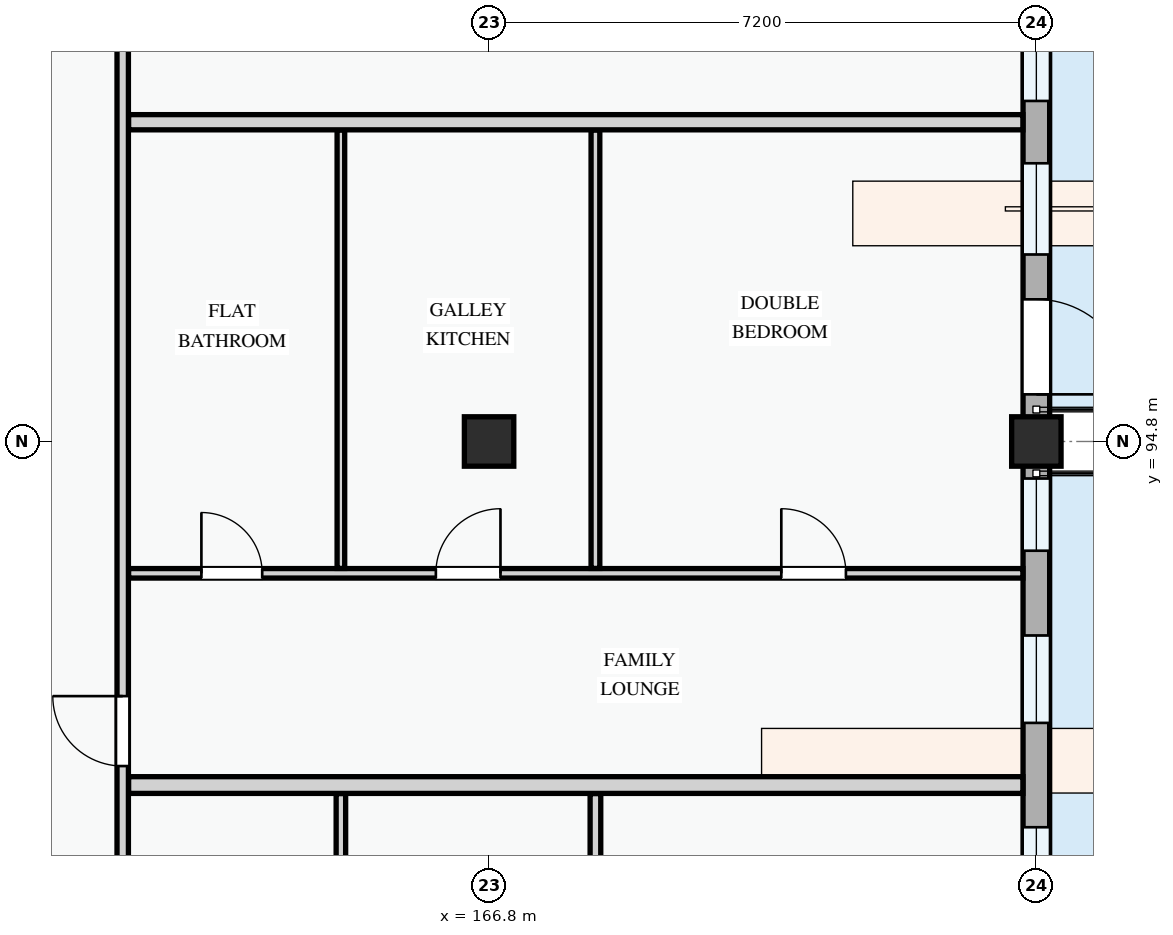
"""IFC4 building model, lengths in metres.
Left out: names, types, materials, properties, quantities, classifications, styles, units other than length and angle.
Written with IfcOpenShell. Run it as: python <this file> out.ifc"""

import sys

from ifc_helpers import new_model, si_unit, direction, frame, frame_2d, origin, origin_2d, place, context, subcontext, project, spatial, rectangle, extrude, element, fill, save


model = new_model("IFC4")
c1 = context("Model", 3, precision=1e-05, world=origin(), true_north=direction((0.0, 1.0)))
c2 = subcontext(c1, "Body", "Model", "MODEL_VIEW")
j1 = project(units=[si_unit("LENGTHUNIT", "METRE"), si_unit("PLANEANGLEUNIT", "RADIAN")], contexts=[c1])
p1 = place(None, origin())
s1 = spatial("IfcSite", under=j1, at=p1, CompositionType="ELEMENT")
p2 = place(p1, origin())
s2 = spatial("IfcBuilding", under=s1, at=p2, CompositionType="ELEMENT")
p3 = place(p2, frame((0.0, 0.0, 11.4)))
s3 = spatial("IfcBuildingStorey", under=s2, at=p3, CompositionType="ELEMENT", Elevation=11.4)
for number, where, z_axis, x_axis in (
    (1, (166.8, 94.8, 0.0), (0.0, 0.0, 1.0), (1.0, 0.0, 0.0)),
    (2, (174.0, 94.8, 0.0), (0.0, 0.0, 1.0), (1.0, 0.0, 0.0)),
):
    element("IfcColumn", number, at=place(p3, frame(where, z_axis=z_axis, x_axis=x_axis)), inside=s3, PredefinedType="COLUMN", context=c2, shape_type="SweptSolid", body=[
        extrude(rectangle(XDim=0.65, YDim=0.65, at=origin_2d()), origin(), (0.0, 0.0, 1.0), 3.3),
    ])
p4 = place(p3, frame((174.0, 86.4, 0.0), z_axis=(0.0, 0.0, 1.0), x_axis=(0.0, 1.0, 0.0)))
e3 = element("IfcWall", 3, at=p4, inside=s3, PredefinedType="STANDARD", context=c2, shape_type="SweptSolid", body=[
    extrude(rectangle(XDim=8.4, YDim=0.35, at=frame_2d((4.2, 0.0))), origin(), (0.0, 0.0, 1.0), 2.425),
])
p5 = place(p4, frame((0.62, 0.0, 0.0)))
e4 = element("IfcOpeningElement", 4, at=p5, cuts=e3, PredefinedType="OPENING", context=c2, shape_type="SweptSolid", body=[
    extrude(rectangle(XDim=1.2, YDim=2.15, at=frame_2d((0.6, 1.075))), frame((0.0, 0.185, 0.0), z_axis=(0.0, -1.0, 0.0), x_axis=(1.0, 0.0, 0.0)), (0.0, 0.0, 1.0), 0.37),
])
p6 = place(p4, frame((2.425, 0.0, 0.78)))
e5 = element("IfcOpeningElement", 5, at=p6, cuts=e3, PredefinedType="OPENING", context=c2, shape_type="SweptSolid", body=[
    extrude(rectangle(XDim=0.9, YDim=1.2, at=frame_2d((0.45, 0.6))), frame((0.0, 0.185, 0.0), z_axis=(0.0, -1.0, 0.0), x_axis=(1.0, 0.0, 0.0)), (0.0, 0.0, 1.0), 0.37),
])
p7 = place(p4, frame((4.698, 0.0, 0.78)))
e6 = element("IfcOpeningElement", 6, at=p7, cuts=e3, PredefinedType="OPENING", context=c2, shape_type="SweptSolid", body=[
    extrude(rectangle(XDim=1.15, YDim=1.25, at=frame_2d((0.575, 0.625))), frame((0.0, 0.185, 0.0), z_axis=(0.0, -1.0, 0.0), x_axis=(1.0, 0.0, 0.0)), (0.0, 0.0, 1.0), 0.37),
])
p8 = place(p4, frame((6.963, 0.0, 0.78)))
e7 = element("IfcOpeningElement", 7, at=p8, cuts=e3, PredefinedType="OPENING", context=c2, shape_type="SweptSolid", body=[
    extrude(rectangle(XDim=0.95, YDim=1.15, at=frame_2d((0.475, 0.575))), frame((0.0, 0.185, 0.0), z_axis=(0.0, -1.0, 0.0), x_axis=(1.0, 0.0, 0.0)), (0.0, 0.0, 1.0), 0.37),
])
p9 = place(p3, frame((174.0, 94.8, 0.0), z_axis=(0.0, 0.0, 1.0), x_axis=(0.0, 1.0, 0.0)))
e8 = element("IfcWall", 8, at=p9, inside=s3, PredefinedType="STANDARD", context=c2, shape_type="SweptSolid", body=[
    extrude(rectangle(XDim=6.0, YDim=0.35, at=frame_2d((3.0, 0.0))), origin(), (0.0, 0.0, 1.0), 2.575),
])
p10 = place(p9, frame((0.62, 0.0, 0.0)))
e9 = element("IfcOpeningElement", 9, at=p10, cuts=e8, PredefinedType="OPENING", context=c2, shape_type="SweptSolid", body=[
    extrude(rectangle(XDim=1.25, YDim=2.2, at=frame_2d((0.625, 1.1))), frame((0.0, 0.185, 0.0), z_axis=(0.0, -1.0, 0.0), x_axis=(1.0, 0.0, 0.0)), (0.0, 0.0, 1.0), 0.37),
])
p11 = place(p9, frame((2.46, 0.0, 0.78)))
e10 = element("IfcOpeningElement", 10, at=p11, cuts=e8, PredefinedType="OPENING", context=c2, shape_type="SweptSolid", body=[
    extrude(rectangle(XDim=1.2, YDim=1.5, at=frame_2d((0.6, 0.75))), frame((0.0, 0.185, 0.0), z_axis=(0.0, -1.0, 0.0), x_axis=(1.0, 0.0, 0.0)), (0.0, 0.0, 1.0), 0.37),
])
p12 = place(p9, frame((4.48, 0.0, 0.78)))
e11 = element("IfcOpeningElement", 11, at=p12, cuts=e8, PredefinedType="OPENING", context=c2, shape_type="SweptSolid", body=[
    extrude(rectangle(XDim=1.05, YDim=1.2, at=frame_2d((0.525, 0.6))), frame((0.0, 0.185, 0.0), z_axis=(0.0, -1.0, 0.0), x_axis=(1.0, 0.0, 0.0)), (0.0, 0.0, 1.0), 0.37),
])
p13 = place(p3, frame((168.199, 84.726, 0.0), z_axis=(0.0, 0.0, 1.0), x_axis=(0.0, 1.0, 0.0)))
e12 = element("IfcWall", 12, at=p13, inside=s3, PredefinedType="PARTITIONING", context=c2, shape_type="SweptSolid", body=[
    extrude(rectangle(XDim=5.442, YDim=0.14, at=frame_2d((2.721, 0.0))), origin(), (0.0, 0.0, 1.0), 3.0),
])
p14 = place(p3, frame((164.85, 84.726, 0.0), z_axis=(0.0, 0.0, 1.0), x_axis=(0.0, 1.0, 0.0)))
e13 = element("IfcWall", 13, at=p14, inside=s3, PredefinedType="PARTITIONING", context=c2, shape_type="SweptSolid", body=[
    extrude(rectangle(XDim=5.442, YDim=0.125, at=frame_2d((2.721, 0.0))), origin(), (0.0, 0.0, 1.0), 3.0),
])
p15 = place(p3, frame((162.057, 93.066, 0.0), z_axis=(0.0, 0.0, 1.0), x_axis=(1.0, 0.0, 0.0)))
e14 = element("IfcWall", 14, at=p15, inside=s3, PredefinedType="PARTITIONING", context=c2, shape_type="SweptSolid", body=[
    extrude(rectangle(XDim=11.766, YDim=0.125, at=frame_2d((5.883, 0.0))), origin(), (0.0, 0.0, 1.0), 3.0),
])
p16 = place(p15, frame((0.958, 0.0, 0.0)))
e15 = element("IfcOpeningElement", 15, at=p16, cuts=e14, PredefinedType="OPENING", context=c2, shape_type="SweptSolid", body=[
    extrude(rectangle(XDim=0.8, YDim=2.1, at=frame_2d((0.4, 1.05))), frame((0.0, 0.073, 0.0), z_axis=(0.0, -1.0, 0.0), x_axis=(1.0, 0.0, 0.0)), (0.0, 0.0, 1.0), 0.145),
])
p17 = place(p15, frame((4.043, 0.0, 0.0)))
e16 = element("IfcOpeningElement", 16, at=p17, cuts=e14, PredefinedType="OPENING", context=c2, shape_type="SweptSolid", body=[
    extrude(rectangle(XDim=0.85, YDim=2.1, at=frame_2d((0.425, 1.05))), frame((0.0, 0.073, 0.0), z_axis=(0.0, -1.0, 0.0), x_axis=(1.0, 0.0, 0.0)), (0.0, 0.0, 1.0), 0.145),
])
p18 = place(p15, frame((8.588, 0.0, 0.0)))
e17 = element("IfcOpeningElement", 17, at=p18, cuts=e14, PredefinedType="OPENING", context=c2, shape_type="SweptSolid", body=[
    extrude(rectangle(XDim=0.85, YDim=2.1, at=frame_2d((0.425, 1.05))), frame((0.0, 0.073, 0.0), z_axis=(0.0, -1.0, 0.0), x_axis=(1.0, 0.0, 0.0)), (0.0, 0.0, 1.0), 0.145),
])
p19 = place(p3, frame((168.199, 93.13, 0.0), z_axis=(0.0, 0.0, 1.0), x_axis=(0.0, 1.0, 0.0)))
e18 = element("IfcWall", 18, at=p19, inside=s3, PredefinedType="PARTITIONING", context=c2, shape_type="SweptSolid", body=[
    extrude(rectangle(XDim=5.768, YDim=0.115, at=frame_2d((2.884, 0.0))), origin(), (0.0, 0.0, 1.0), 3.0),
])
p20 = place(p3, frame((164.85, 93.13, 0.0), z_axis=(0.0, 0.0, 1.0), x_axis=(0.0, 1.0, 0.0)))
e19 = element("IfcWall", 19, at=p20, inside=s3, PredefinedType="PARTITIONING", context=c2, shape_type="SweptSolid", body=[
    extrude(rectangle(XDim=5.768, YDim=0.1, at=frame_2d((2.884, 0.0))), origin(), (0.0, 0.0, 1.0), 3.0),
])
p21 = place(p3, frame((162.057, 90.28, 0.0), z_axis=(0.0, 0.0, 1.0), x_axis=(1.0, 0.0, 0.0)))
e20 = element("IfcWall", 20, at=p21, inside=s3, PredefinedType="PARTITIONING", context=c2, shape_type="SweptSolid", body=[
    extrude(rectangle(XDim=11.766, YDim=0.22, at=frame_2d((5.883, 0.0))), origin(), (0.0, 0.0, 1.0), 3.0),
])
p22 = place(p3, frame((162.057, 99.0, 0.0), z_axis=(0.0, 0.0, 1.0), x_axis=(1.0, 0.0, 0.0)))
e21 = element("IfcWall", 21, at=p22, inside=s3, PredefinedType="PARTITIONING", context=c2, shape_type="SweptSolid", body=[
    extrude(rectangle(XDim=11.766, YDim=0.2, at=frame_2d((5.883, 0.0))), origin(), (0.0, 0.0, 1.0), 3.0),
])
p23 = place(p3, frame((161.98, 80.46, 0.0), z_axis=(0.0, 0.0, 1.0), x_axis=(0.0, 1.0, 0.0)))
e22 = element("IfcWall", 22, at=p23, inside=s3, PredefinedType="PARTITIONING", context=c2, shape_type="SweptSolid", body=[
    extrude(rectangle(XDim=28.88, YDim=0.15, at=frame_2d((14.44, 0.0))), origin(), (0.0, 0.0, 1.0), 3.0),
])
p24 = place(p23, frame((2.487, 0.0, 0.0)))
e23 = element("IfcOpeningElement", 23, at=p24, cuts=e22, PredefinedType="OPENING", context=c2, shape_type="SweptSolid", body=[
    extrude(rectangle(XDim=0.96, YDim=2.12, at=frame_2d((0.48, 1.06))), frame((0.0, 0.085, 0.0), z_axis=(0.0, -1.0, 0.0), x_axis=(1.0, 0.0, 0.0)), (0.0, 0.0, 1.0), 0.17),
])
p25 = place(p23, frame((10.07, 0.0, 0.0)))
e24 = element("IfcOpeningElement", 24, at=p25, cuts=e22, PredefinedType="OPENING", context=c2, shape_type="SweptSolid", body=[
    extrude(rectangle(XDim=0.92, YDim=2.1, at=frame_2d((0.46, 1.05))), frame((0.0, 0.085, 0.0), z_axis=(0.0, -1.0, 0.0), x_axis=(1.0, 0.0, 0.0)), (0.0, 0.0, 1.0), 0.17),
])
p26 = place(p23, frame((22.293, 0.0, 0.0)))
e25 = element("IfcOpeningElement", 25, at=p26, cuts=e22, PredefinedType="OPENING", context=c2, shape_type="SweptSolid", body=[
    extrude(rectangle(XDim=0.92, YDim=2.1, at=frame_2d((0.46, 1.05))), frame((0.0, 0.085, 0.0), z_axis=(0.0, -1.0, 0.0), x_axis=(1.0, 0.0, 0.0)), (0.0, 0.0, 1.0), 0.17),
])
p27 = place(p6, origin())
e26 = element("IfcWindow", 26, at=p27, inside=s3, PartitioningType="SINGLE_PANEL", PredefinedType="WINDOW", context=c2, shape_type="SweptSolid", body=[
    extrude(rectangle(XDim=0.9, YDim=1.2, at=frame_2d((0.45, 0.6))), frame((0.0, 0.03, 0.0), z_axis=(0.0, -1.0, 0.0), x_axis=(1.0, 0.0, 0.0)), (0.0, 0.0, 1.0), 0.06),
])
fill(e5, e26)
p28 = place(p7, origin())
e27 = element("IfcWindow", 27, at=p28, inside=s3, PartitioningType="SINGLE_PANEL", PredefinedType="WINDOW", context=c2, shape_type="SweptSolid", body=[
    extrude(rectangle(XDim=1.15, YDim=1.25, at=frame_2d((0.575, 0.625))), frame((0.0, 0.03, 0.0), z_axis=(0.0, -1.0, 0.0), x_axis=(1.0, 0.0, 0.0)), (0.0, 0.0, 1.0), 0.06),
])
fill(e6, e27)
p29 = place(p8, origin())
e28 = element("IfcWindow", 28, at=p29, inside=s3, PartitioningType="SINGLE_PANEL", PredefinedType="WINDOW", context=c2, shape_type="SweptSolid", body=[
    extrude(rectangle(XDim=0.95, YDim=1.15, at=frame_2d((0.475, 0.575))), frame((0.0, 0.03, 0.0), z_axis=(0.0, -1.0, 0.0), x_axis=(1.0, 0.0, 0.0)), (0.0, 0.0, 1.0), 0.06),
])
fill(e7, e28)
p30 = place(p10, frame((1.25, 0.0, 0.0), z_axis=(0.0, 0.0, 1.0), x_axis=(-1.0, 0.0, 0.0)))
e29 = element("IfcDoor", 29, at=p30, inside=s3, OperationType="SINGLE_SWING_RIGHT", PredefinedType="DOOR", context=c2, shape_type="SweptSolid", body=[
    extrude(rectangle(XDim=1.25, YDim=2.2, at=frame_2d((0.625, 1.1))), frame((0.0, 0.025, 0.0), z_axis=(0.0, -1.0, 0.0), x_axis=(1.0, 0.0, 0.0)), (0.0, 0.0, 1.0), 0.05),
])
fill(e9, e29)
p31 = place(p11, origin())
e30 = element("IfcWindow", 30, at=p31, inside=s3, PartitioningType="SINGLE_PANEL", PredefinedType="WINDOW", context=c2, shape_type="SweptSolid", body=[
    extrude(rectangle(XDim=1.2, YDim=1.5, at=frame_2d((0.6, 0.75))), frame((0.0, 0.03, 0.0), z_axis=(0.0, -1.0, 0.0), x_axis=(1.0, 0.0, 0.0)), (0.0, 0.0, 1.0), 0.06),
])
fill(e10, e30)
p32 = place(p12, origin())
e31 = element("IfcWindow", 31, at=p32, inside=s3, PartitioningType="SINGLE_PANEL", PredefinedType="WINDOW", context=c2, shape_type="SweptSolid", body=[
    extrude(rectangle(XDim=1.05, YDim=1.2, at=frame_2d((0.525, 0.6))), frame((0.0, 0.03, 0.0), z_axis=(0.0, -1.0, 0.0), x_axis=(1.0, 0.0, 0.0)), (0.0, 0.0, 1.0), 0.06),
])
fill(e11, e31)
p33 = place(p16, origin())
e32 = element("IfcDoor", 32, at=p33, inside=s3, OperationType="SINGLE_SWING_LEFT", PredefinedType="DOOR", context=c2, shape_type="SweptSolid", body=[
    extrude(rectangle(XDim=0.8, YDim=2.1, at=frame_2d((0.4, 1.05))), frame((0.0, 0.025, 0.0), z_axis=(0.0, -1.0, 0.0), x_axis=(1.0, 0.0, 0.0)), (0.0, 0.0, 1.0), 0.05),
])
fill(e15, e32)
p34 = place(p17, origin())
e33 = element("IfcDoor", 33, at=p34, inside=s3, OperationType="SINGLE_SWING_RIGHT", PredefinedType="DOOR", context=c2, shape_type="SweptSolid", body=[
    extrude(rectangle(XDim=0.85, YDim=2.1, at=frame_2d((0.425, 1.05))), frame((0.0, 0.025, 0.0), z_axis=(0.0, -1.0, 0.0), x_axis=(1.0, 0.0, 0.0)), (0.0, 0.0, 1.0), 0.05),
])
fill(e16, e33)
p35 = place(p18, origin())
e34 = element("IfcDoor", 34, at=p35, inside=s3, OperationType="SINGLE_SWING_LEFT", PredefinedType="DOOR", context=c2, shape_type="SweptSolid", body=[
    extrude(rectangle(XDim=0.85, YDim=2.1, at=frame_2d((0.425, 1.05))), frame((0.0, 0.025, 0.0), z_axis=(0.0, -1.0, 0.0), x_axis=(1.0, 0.0, 0.0)), (0.0, 0.0, 1.0), 0.05),
])
fill(e17, e34)
p36 = place(p25, origin())
e35 = element("IfcDoor", 35, at=p36, inside=s3, OperationType="SINGLE_SWING_RIGHT", PredefinedType="DOOR", context=c2, shape_type="SweptSolid", body=[
    extrude(rectangle(XDim=0.92, YDim=2.1, at=frame_2d((0.46, 1.05))), frame((0.0, 0.025, 0.0), z_axis=(0.0, -1.0, 0.0), x_axis=(1.0, 0.0, 0.0)), (0.0, 0.0, 1.0), 0.05),
])
fill(e24, e35)
save(model, sys.argv[1])
